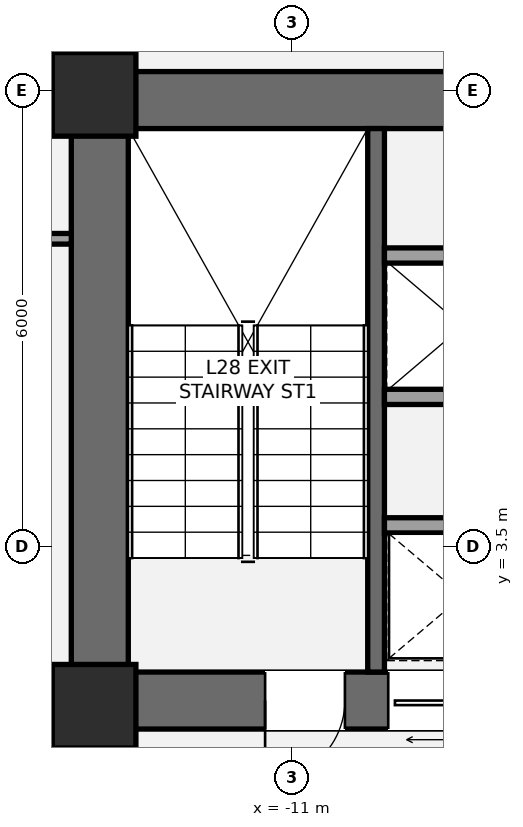
"""IFC4 building model, lengths in metres.
Left out: names, types, materials, properties, quantities, classifications, styles, units other than length and angle.
Written with IfcOpenShell. Run it as: python <this file> out.ifc"""

import sys

from ifc_helpers import new_model, si_unit, direction, frame, frame_2d, origin, origin_2d, place, context, subcontext, project, spatial, rectangle, extrude, element, fill, save


model = new_model("IFC4")
c1 = context("Model", 3, precision=1e-05, world=origin(), true_north=direction((0.0, 1.0)))
c2 = subcontext(c1, "Body", "Model", "MODEL_VIEW")
j1 = project(units=[si_unit("LENGTHUNIT", "METRE"), si_unit("PLANEANGLEUNIT", "RADIAN")], contexts=[c1])
p1 = place(None, origin())
s1 = spatial("IfcSite", under=j1, at=p1, CompositionType="ELEMENT")
p2 = place(p1, origin())
s2 = spatial("IfcBuilding", under=s1, at=p2, CompositionType="ELEMENT")
p3 = place(p2, frame((0.0, 0.0, 107.1)))
s3 = spatial("IfcBuildingStorey", under=s2, at=p3, CompositionType="ELEMENT", Elevation=107.1)
p4 = place(p3, frame((-13.525, 1.1, 0.0), z_axis=(0.0, 0.0, 1.0), x_axis=(0.0, 1.0, 0.0)))
e1 = element("IfcWall", 1, at=p4, inside=s3, PredefinedType="SHEAR", context=c2, shape_type="SweptSolid", body=[
    extrude(rectangle(XDim=8.65, YDim=0.75, at=frame_2d((4.325, 0.0))), origin(), (0.0, 0.0, 1.0), 3.5),
])
p5 = place(p3, frame((-13.9, 9.375, 0.0), z_axis=(0.0, 0.0, 1.0), x_axis=(1.0, 0.0, 0.0)))
e2 = element("IfcWall", 2, at=p5, inside=s3, PredefinedType="SHEAR", context=c2, shape_type="SweptSolid", body=[
    extrude(rectangle(XDim=9.475, YDim=0.75, at=frame_2d((4.737, 0.0))), origin(), (0.0, 0.0, 1.0), 3.5),
])
p6 = place(p3, frame((-4.825, 1.475, 0.0), z_axis=(0.0, 0.0, 1.0), x_axis=(-1.0, 0.0, 0.0)))
e3 = element("IfcWall", 3, at=p6, inside=s3, PredefinedType="SHEAR", context=c2, shape_type="SweptSolid", body=[
    extrude(rectangle(XDim=9.075, YDim=0.75, at=frame_2d((4.538, 0.0))), origin(), (0.0, 0.0, 1.0), 3.5),
])
p7 = place(p6, frame((5.475, 0.0, 0.0)))
e4 = element("IfcOpeningElement", 4, at=p7, cuts=e3, PredefinedType="OPENING", context=c2, shape_type="SweptSolid", body=[
    extrude(rectangle(XDim=1.05, YDim=2.15, at=frame_2d((0.525, 1.075))), frame((0.0, 0.385, 0.0), z_axis=(0.0, -1.0, 0.0), x_axis=(1.0, 0.0, 0.0)), (0.0, 0.0, 1.0), 0.77),
])
p8 = place(p6, frame((3.805, 0.0, 0.0)))
e5 = element("IfcOpeningElement", 5, at=p8, cuts=e3, PredefinedType="OPENING", context=c2, shape_type="SweptSolid", body=[
    extrude(rectangle(XDim=1.1, YDim=2.2, at=frame_2d((0.55, 1.1))), frame((0.0, 0.385, 0.0), z_axis=(0.0, -1.0, 0.0), x_axis=(1.0, 0.0, 0.0)), (0.0, 0.0, 1.0), 0.77),
])
p9 = place(p3, frame((-9.89, 1.85, 0.0), z_axis=(0.0, 0.0, 1.0), x_axis=(0.0, 1.0, 0.0)))
e6 = element("IfcWall", 6, at=p9, inside=s3, PredefinedType="SHEAR", context=c2, shape_type="SweptSolid", body=[
    extrude(rectangle(XDim=7.15, YDim=0.22, at=frame_2d((3.575, 0.0))), origin(), (0.0, 0.0, 1.0), 3.5),
])
for number, where, z_axis, x_axis in (
    (7, (-13.6, 1.4, 0.0), (0.0, 0.0, 1.0), (1.0, 0.0, 0.0)),
    (8, (-13.6, 9.45, 0.0), (0.0, 0.0, 1.0), (1.0, 0.0, 0.0)),
):
    element("IfcColumn", number, at=place(p3, frame(where, z_axis=z_axis, x_axis=x_axis)), inside=s3, PredefinedType="COLUMN", context=c2, shape_type="SweptSolid", body=[
        extrude(rectangle(XDim=1.1, YDim=1.1, at=origin_2d()), origin(), (0.0, 0.0, 1.0), 3.5),
    ])
p10 = place(p3, frame((-13.45, -2.15, 0.0), z_axis=(0.0, 0.0, 1.0), x_axis=(0.0, 1.0, 0.0)))
e9 = element("IfcWall", 9, at=p10, inside=s3, PredefinedType="PARTITIONING", context=c2, shape_type="SweptSolid", body=[
    extrude(rectangle(XDim=3.3, YDim=0.165, at=frame_2d((1.65, 0.0))), origin(), (0.0, 0.0, 1.0), 2.763),
])
p11 = place(p10, frame((1.15, 0.0, 0.0)))
e10 = element("IfcOpeningElement", 10, at=p11, cuts=e9, PredefinedType="OPENING", context=c2, shape_type="SweptSolid", body=[
    extrude(rectangle(XDim=1.05, YDim=2.15, at=frame_2d((0.525, 1.075))), frame((0.0, 0.093, 0.0), z_axis=(0.0, -1.0, 0.0), x_axis=(1.0, 0.0, 0.0)), (0.0, 0.0, 1.0), 0.185),
])
for number, where, z_axis, x_axis in (
    (11, (-9.78, 3.78, 0.0), (0.0, 0.0, 1.0), (1.0, 0.0, 0.0)),
    (12, (-9.78, 5.47, 0.0), (0.0, 0.0, 1.0), (1.0, 0.0, 0.0)),
    (13, (-9.78, 7.33, 0.0), (0.0, 0.0, 1.0), (1.0, 0.0, 0.0)),
):
    element("IfcWall", number, at=place(p3, frame(where, z_axis=z_axis, x_axis=x_axis)), inside=s3, PredefinedType="SOLIDWALL", context=c2, shape_type="SweptSolid", body=[
        extrude(rectangle(XDim=4.205, YDim=0.2, at=frame_2d((2.103, 0.0))), origin(), (0.0, 0.0, 1.0), 3.31),
    ])
p12 = place(p3, frame((-17.5, 7.55, 0.0), z_axis=(0.0, 0.0, 1.0), x_axis=(1.0, 0.0, 0.0)))
e14 = element("IfcWall", 14, at=p12, inside=s3, PredefinedType="PARTITIONING", context=c2, shape_type="SweptSolid", body=[
    extrude(rectangle(XDim=3.6, YDim=0.14, at=frame_2d((1.8, 0.0))), origin(), (0.0, 0.0, 1.0), 3.31),
])
p13 = place(p12, frame((0.32, 0.0, 0.0)))
e15 = element("IfcOpeningElement", 15, at=p13, cuts=e14, PredefinedType="OPENING", context=c2, shape_type="SweptSolid", body=[
    extrude(rectangle(XDim=0.92, YDim=2.15, at=frame_2d((0.46, 1.075))), frame((0.0, 0.08, 0.0), z_axis=(0.0, -1.0, 0.0), x_axis=(1.0, 0.0, 0.0)), (0.0, 0.0, 1.0), 0.16),
])
p14 = place(p7, origin())
e16 = element("IfcDoor", 16, at=p14, inside=s3, OperationType="SINGLE_SWING_RIGHT", PredefinedType="DOOR", context=c2, shape_type="SweptSolid", body=[
    extrude(rectangle(XDim=1.05, YDim=2.15, at=frame_2d((0.525, 1.075))), frame((0.0, 0.025, 0.0), z_axis=(0.0, -1.0, 0.0), x_axis=(1.0, 0.0, 0.0)), (0.0, 0.0, 1.0), 0.05),
])
fill(e4, e16)
p15 = place(p8, origin())
e17 = element("IfcDoor", 17, at=p15, inside=s3, OperationType="SLIDING_TO_LEFT", PredefinedType="DOOR", context=c2, shape_type="SweptSolid", body=[
    extrude(rectangle(XDim=1.1, YDim=2.2, at=frame_2d((0.55, 1.1))), frame((0.0, 0.025, 0.0), z_axis=(0.0, -1.0, 0.0), x_axis=(1.0, 0.0, 0.0)), (0.0, 0.0, 1.0), 0.05),
])
fill(e5, e17)
save(model, sys.argv[1])
